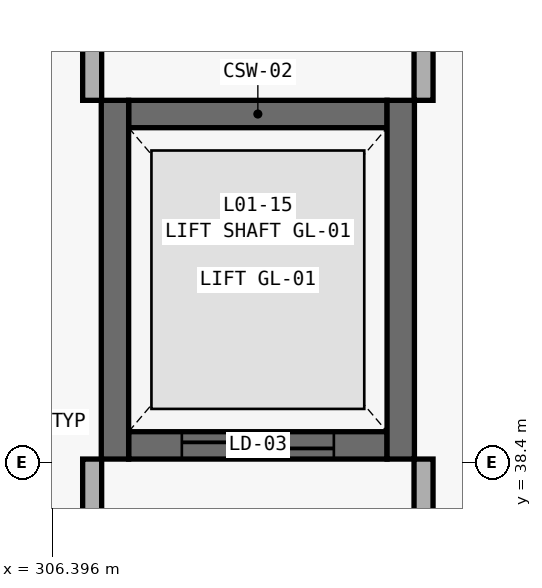
"""IFC4 building model, lengths in metres.
Left out: names, types, materials, properties, quantities, classifications, styles, units other than length and angle.
Written with IfcOpenShell. Run it as: python <this file> out.ifc"""

import sys

from ifc_helpers import new_model, si_unit, direction, frame, frame_2d, origin, place, context, subcontext, project, spatial, rectangle, extrude, element, fill, save


model = new_model("IFC4")
c1 = context("Model", 3, precision=1e-05, world=origin(), true_north=direction((0.0, 1.0)))
c2 = subcontext(c1, "Body", "Model", "MODEL_VIEW")
j1 = project(units=[si_unit("LENGTHUNIT", "METRE"), si_unit("PLANEANGLEUNIT", "RADIAN")], contexts=[c1])
p1 = place(None, origin())
s1 = spatial("IfcSite", under=j1, at=p1, CompositionType="ELEMENT")
p2 = place(p1, origin())
s2 = spatial("IfcBuilding", under=s1, at=p2, CompositionType="ELEMENT")
p3 = place(p2, frame((0.0, 0.0, 4.8)))
s3 = spatial("IfcBuildingStorey", under=s2, at=p3, CompositionType="ELEMENT", Elevation=4.8)
p4 = place(p3, frame((307.4, 42.98, 0.0), z_axis=(0.0, 0.0, 1.0), x_axis=(1.0, 0.0, 0.0)))
e1 = element("IfcWall", 1, at=p4, inside=s3, PredefinedType="SHEAR", context=c2, shape_type="SweptSolid", body=[
    extrude(rectangle(XDim=3.4, YDim=0.36, at=frame_2d((1.7, 0.0))), origin(), (0.0, 0.0, 1.0), 3.88),
])
p5 = place(p3, frame((307.4, 38.62, 0.0), z_axis=(0.0, 0.0, 1.0), x_axis=(1.0, 0.0, 0.0)))
e2 = element("IfcWall", 2, at=p5, inside=s3, PredefinedType="SHEAR", context=c2, shape_type="SweptSolid", body=[
    extrude(rectangle(XDim=3.4, YDim=0.36, at=frame_2d((1.7, 0.0))), origin(), (0.0, 0.0, 1.0), 3.88),
])
p6 = place(p5, frame((0.7, 0.0, 0.0)))
e3 = element("IfcOpeningElement", 3, at=p6, cuts=e2, PredefinedType="OPENING", context=c2, shape_type="SweptSolid", body=[
    extrude(rectangle(XDim=2.0, YDim=2.4, at=frame_2d((1.0, 1.2))), frame((0.0, 0.195, 0.0), z_axis=(0.0, -1.0, 0.0), x_axis=(1.0, 0.0, 0.0)), (0.0, 0.0, 1.0), 0.39),
])
for number, where, z_axis, x_axis in (
    (4, (307.22, 38.44, 0.0), (0.0, 0.0, 1.0), (0.0, 1.0, 0.0)),
    (5, (310.98, 38.44, 0.0), (0.0, 0.0, 1.0), (0.0, 1.0, 0.0)),
):
    element("IfcWall", number, at=place(p3, frame(where, z_axis=z_axis, x_axis=x_axis)), inside=s3, PredefinedType="SHEAR", context=c2, shape_type="SweptSolid", body=[
        extrude(rectangle(XDim=4.72, YDim=0.36, at=frame_2d((2.36, 0.0))), origin(), (0.0, 0.0, 1.0), 3.88),
    ])
p7 = place(p3, frame((306.92, 36.645, 0.0), z_axis=(0.0, 0.0, 1.0), x_axis=(0.0, 1.0, 0.0)))
e6 = element("IfcWall", 6, at=p7, inside=s3, PredefinedType="PARTITIONING", context=c2, shape_type="SweptSolid", body=[
    extrude(rectangle(XDim=1.795, YDim=0.25, at=frame_2d((0.897, 0.0))), origin(), (0.0, 0.0, 1.0), 2.76),
])
p8 = place(p3, frame((306.92, 43.16, 0.0), z_axis=(0.0, 0.0, 1.0), x_axis=(0.0, 1.0, 0.0)))
e7 = element("IfcWall", 7, at=p8, inside=s3, PredefinedType="PARTITIONING", context=c2, shape_type="SweptSolid", body=[
    extrude(rectangle(XDim=0.795, YDim=0.25, at=frame_2d((0.397, 0.0))), origin(), (0.0, 0.0, 1.0), 2.76),
])
p9 = place(p3, frame((311.28, 36.645, 0.0), z_axis=(0.0, 0.0, 1.0), x_axis=(0.0, 1.0, 0.0)))
e8 = element("IfcWall", 8, at=p9, inside=s3, PredefinedType="PARTITIONING", context=c2, shape_type="SweptSolid", body=[
    extrude(rectangle(XDim=1.795, YDim=0.25, at=frame_2d((0.897, 0.0))), origin(), (0.0, 0.0, 1.0), 2.76),
])
p10 = place(p3, frame((311.28, 43.16, 0.0), z_axis=(0.0, 0.0, 1.0), x_axis=(0.0, 1.0, 0.0)))
e9 = element("IfcWall", 9, at=p10, inside=s3, PredefinedType="PARTITIONING", context=c2, shape_type="SweptSolid", body=[
    extrude(rectangle(XDim=0.795, YDim=0.25, at=frame_2d((0.397, 0.0))), origin(), (0.0, 0.0, 1.0), 2.76),
])
p11 = place(p6, origin())
e10 = element("IfcDoor", 10, at=p11, inside=s3, OperationType="DOUBLE_DOOR_SLIDING", PredefinedType="DOOR", context=c2, shape_type="SweptSolid", body=[
    extrude(rectangle(XDim=2.0, YDim=2.4, at=frame_2d((1.0, 1.2))), frame((0.0, 0.025, 0.0), z_axis=(0.0, -1.0, 0.0), x_axis=(1.0, 0.0, 0.0)), (0.0, 0.0, 1.0), 0.05),
])
fill(e3, e10)
save(model, sys.argv[1])
